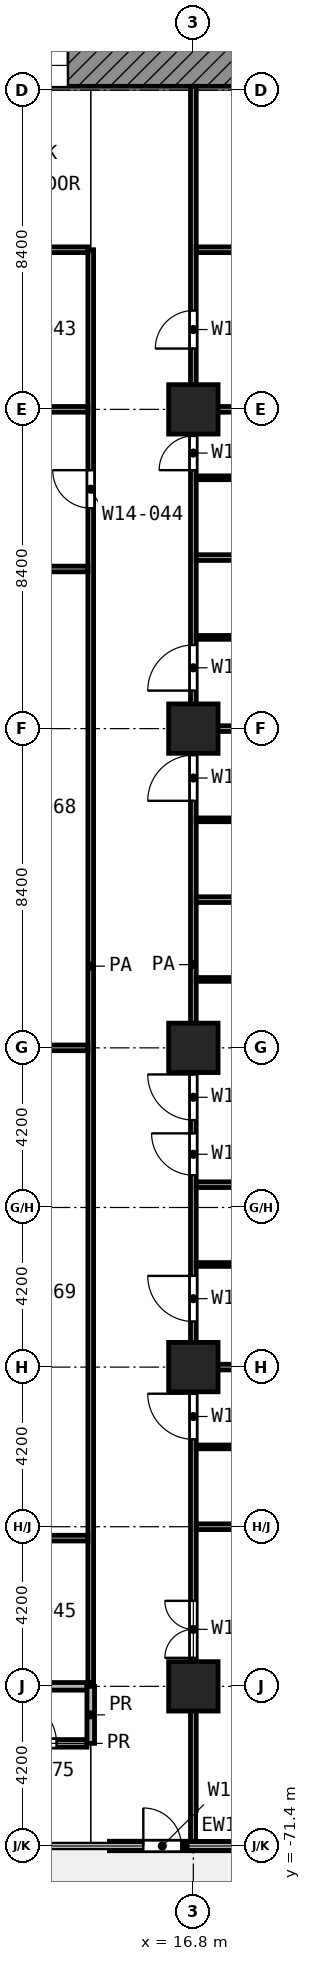
"""IFC4 building model, lengths in metres.
Left out: names, types, materials, properties, quantities, classifications, styles, units other than length and angle.
Written with IfcOpenShell. Run it as: python <this file> out.ifc"""

import sys

from ifc_helpers import new_model, si_unit, direction, frame, frame_2d, origin, origin_2d, place, context, subcontext, project, spatial, rectangle, extrude, element, fill, save


model = new_model("IFC4")
c1 = context("Model", 3, precision=1e-05, world=origin(), true_north=direction((0.0, 1.0)))
c2 = subcontext(c1, "Body", "Model", "MODEL_VIEW")
j1 = project(units=[si_unit("LENGTHUNIT", "METRE"), si_unit("PLANEANGLEUNIT", "RADIAN")], contexts=[c1])
p1 = place(None, origin())
s1 = spatial("IfcSite", under=j1, at=p1, CompositionType="ELEMENT")
p2 = place(p1, origin())
s2 = spatial("IfcBuilding", under=s1, at=p2, CompositionType="ELEMENT")
p3 = place(p2, frame((0.0, 0.0, 64.4)))
s3 = spatial("IfcBuildingStorey", under=s2, at=p3, CompositionType="ELEMENT", Elevation=64.4)
for number, where, z_axis, x_axis in (
    (1, (16.8, -33.6, 0.0), (0.0, 0.0, 1.0), (1.0, 0.0, 0.0)),
    (2, (16.8, -42.0, 0.0), (0.0, 0.0, 1.0), (1.0, 0.0, 0.0)),
    (3, (16.8, -50.4, 0.0), (0.0, 0.0, 1.0), (1.0, 0.0, 0.0)),
    (4, (16.8, -58.8, 0.0), (0.0, 0.0, 1.0), (1.0, 0.0, 0.0)),
    (5, (16.8, -67.2, 0.0), (0.0, 0.0, 1.0), (1.0, 0.0, 0.0)),
):
    element("IfcColumn", number, at=place(p3, frame(where, z_axis=z_axis, x_axis=x_axis)), inside=s3, PredefinedType="COLUMN", context=c2, shape_type="SweptSolid", body=[
        extrude(rectangle(XDim=1.3, YDim=1.3, at=origin_2d()), origin(), (0.0, 0.0, 1.0), 4.2),
    ])
p4 = place(p3, frame((14.592, -71.4, 0.0), z_axis=(0.0, 0.0, 1.0), x_axis=(1.0, 0.0, 0.0)))
e6 = element("IfcWall", 6, at=p4, inside=s3, PredefinedType="SOLIDWALL", context=c2, shape_type="SweptSolid", body=[
    extrude(rectangle(XDim=3.983, YDim=0.25, at=frame_2d((1.992, 0.0))), origin(), (0.0, 0.0, 1.0), 3.78),
])
p5 = place(p4, frame((0.892, 0.0, 0.0)))
e7 = element("IfcOpeningElement", 7, at=p5, cuts=e6, PredefinedType="OPENING", context=c2, shape_type="SweptSolid", body=[
    extrude(rectangle(XDim=1.0, YDim=2.1, at=frame_2d((0.5, 1.05))), frame((0.0, 0.135, 0.0), z_axis=(0.0, -1.0, 0.0), x_axis=(1.0, 0.0, 0.0)), (0.0, 0.0, 1.0), 0.27),
])
p6 = place(p3, frame((5.4, -24.55, 0.0), z_axis=(0.0, 0.0, 1.0), x_axis=(1.0, 0.0, 0.0)))
e8 = element("IfcWall", 8, at=p6, inside=s3, PredefinedType="SHEAR", context=c2, shape_type="SweptSolid", body=[
    extrude(rectangle(XDim=18.6, YDim=1.1, at=frame_2d((9.3, 0.0))), origin(), (0.0, 0.0, 1.0), 3.9),
])
p7 = place(p6, frame((6.3, 0.0, 0.0)))
e9 = element("IfcOpeningElement", 9, at=p7, cuts=e8, PredefinedType="OPENING", context=c2, shape_type="SweptSolid", body=[
    extrude(rectangle(XDim=1.8, YDim=2.1, at=frame_2d((0.9, 1.05))), frame((0.0, 0.56, 0.0), z_axis=(0.0, -1.0, 0.0), x_axis=(1.0, 0.0, 0.0)), (0.0, 0.0, 1.0), 1.12),
])
p8 = place(p3, frame((16.875, -60.9, 0.0), z_axis=(0.0, 0.0, 1.0), x_axis=(1.0, 0.0, 0.0)))
e10 = element("IfcWall", 10, at=p8, inside=s3, PredefinedType="PARTITIONING", context=c2, shape_type="SweptSolid", body=[
    extrude(rectangle(XDim=3.175, YDim=0.1, at=frame_2d((1.587, 0.0))), origin(), (0.0, 0.0, 1.0), 3.9),
])
p9 = place(p3, frame((16.875, -56.1, 0.0), z_axis=(0.0, 0.0, 1.0), x_axis=(1.0, 0.0, 0.0)))
e11 = element("IfcWall", 11, at=p9, inside=s3, PredefinedType="PARTITIONING", context=c2, shape_type="SweptSolid", body=[
    extrude(rectangle(XDim=2.575, YDim=0.1, at=frame_2d((1.288, 0.0))), origin(), (0.0, 0.0, 1.0), 3.9),
])
p10 = place(p3, frame((16.875, -48.6, 0.0), z_axis=(0.0, 0.0, 1.0), x_axis=(1.0, 0.0, 0.0)))
e12 = element("IfcWall", 12, at=p10, inside=s3, PredefinedType="PARTITIONING", context=c2, shape_type="SweptSolid", body=[
    extrude(rectangle(XDim=2.574, YDim=0.1, at=frame_2d((1.287, 0.0))), origin(), (0.0, 0.0, 1.0), 3.9),
])
p11 = place(p3, frame((16.875, -44.4, 0.0), z_axis=(0.0, 0.0, 1.0), x_axis=(1.0, 0.0, 0.0)))
e13 = element("IfcWall", 13, at=p11, inside=s3, PredefinedType="PARTITIONING", context=c2, shape_type="SweptSolid", body=[
    extrude(rectangle(XDim=3.175, YDim=0.1, at=frame_2d((1.587, 0.0))), origin(), (0.0, 0.0, 1.0), 3.9),
])
for number, where, z_axis, x_axis in (
    (14, (16.875, -39.6, 0.0), (0.0, 0.0, 1.0), (1.0, 0.0, 0.0)),
    (15, (16.875, -35.4, 0.0), (0.0, 0.0, 1.0), (1.0, 0.0, 0.0)),
):
    element("IfcWall", number, at=place(p3, frame(where, z_axis=z_axis, x_axis=x_axis)), inside=s3, PredefinedType="PARTITIONING", context=c2, shape_type="SweptSolid", body=[
        extrude(rectangle(XDim=2.575, YDim=0.1, at=frame_2d((1.288, 0.0))), origin(), (0.0, 0.0, 1.0), 3.9),
    ])
p12 = place(p3, frame((11.175, -63.3, 0.0), z_axis=(0.0, 0.0, 1.0), x_axis=(1.0, 0.0, 0.0)))
e16 = element("IfcWall", 16, at=p12, inside=s3, PredefinedType="PARTITIONING", context=c2, shape_type="SweptSolid", body=[
    extrude(rectangle(XDim=2.85, YDim=0.15, at=frame_2d((1.425, 0.0))), origin(), (0.0, 0.0, 1.0), 3.9),
])
for number, where, z_axis, x_axis in (
    (17, (16.875, -63.0, 0.0), (0.0, 0.0, 1.0), (1.0, 0.0, 0.0)),
    (18, (16.875, -58.8, 0.0), (0.0, 0.0, 1.0), (1.0, 0.0, 0.0)),
    (19, (16.875, -54.0, 0.0), (0.0, 0.0, 1.0), (1.0, 0.0, 0.0)),
):
    element("IfcWall", number, at=place(p3, frame(where, z_axis=z_axis, x_axis=x_axis)), inside=s3, PredefinedType="PARTITIONING", context=c2, shape_type="SweptSolid", body=[
        extrude(rectangle(XDim=8.245, YDim=0.15, at=frame_2d((4.123, 0.0))), origin(), (0.0, 0.0, 1.0), 3.9),
    ])
p13 = place(p3, frame((11.175, -50.4, 0.0), z_axis=(0.0, 0.0, 1.0), x_axis=(1.0, 0.0, 0.0)))
e20 = element("IfcWall", 20, at=p13, inside=s3, PredefinedType="PARTITIONING", context=c2, shape_type="SweptSolid", body=[
    extrude(rectangle(XDim=2.85, YDim=0.15, at=frame_2d((1.425, 0.0))), origin(), (0.0, 0.0, 1.0), 3.9),
])
for number, where, z_axis, x_axis in (
    (21, (16.875, -46.5, 0.0), (0.0, 0.0, 1.0), (1.0, 0.0, 0.0)),
    (22, (16.875, -42.0, 0.0), (0.0, 0.0, 1.0), (1.0, 0.0, 0.0)),
):
    element("IfcWall", number, at=place(p3, frame(where, z_axis=z_axis, x_axis=x_axis)), inside=s3, PredefinedType="PARTITIONING", context=c2, shape_type="SweptSolid", body=[
        extrude(rectangle(XDim=8.245, YDim=0.15, at=frame_2d((4.123, 0.0))), origin(), (0.0, 0.0, 1.0), 3.9),
    ])
p14 = place(p3, frame((11.175, -37.8, 0.0), z_axis=(0.0, 0.0, 1.0), x_axis=(1.0, 0.0, 0.0)))
e23 = element("IfcWall", 23, at=p14, inside=s3, PredefinedType="PARTITIONING", context=c2, shape_type="SweptSolid", body=[
    extrude(rectangle(XDim=2.85, YDim=0.15, at=frame_2d((1.425, 0.0))), origin(), (0.0, 0.0, 1.0), 3.9),
])
p15 = place(p3, frame((16.875, -37.5, 0.0), z_axis=(0.0, 0.0, 1.0), x_axis=(1.0, 0.0, 0.0)))
e24 = element("IfcWall", 24, at=p15, inside=s3, PredefinedType="PARTITIONING", context=c2, shape_type="SweptSolid", body=[
    extrude(rectangle(XDim=8.245, YDim=0.15, at=frame_2d((4.123, 0.0))), origin(), (0.0, 0.0, 1.0), 3.9),
])
p16 = place(p3, frame((11.175, -33.6, 0.0), z_axis=(0.0, 0.0, 1.0), x_axis=(1.0, 0.0, 0.0)))
e25 = element("IfcWall", 25, at=p16, inside=s3, PredefinedType="PARTITIONING", context=c2, shape_type="SweptSolid", body=[
    extrude(rectangle(XDim=2.85, YDim=0.15, at=frame_2d((1.425, 0.0))), origin(), (0.0, 0.0, 1.0), 3.9),
])
p17 = place(p3, frame((16.875, -33.6, 0.0), z_axis=(0.0, 0.0, 1.0), x_axis=(1.0, 0.0, 0.0)))
e26 = element("IfcWall", 26, at=p17, inside=s3, PredefinedType="PARTITIONING", context=c2, shape_type="SweptSolid", body=[
    extrude(rectangle(XDim=8.245, YDim=0.15, at=frame_2d((4.123, 0.0))), origin(), (0.0, 0.0, 1.0), 3.9),
])
p18 = place(p3, frame((11.175, -29.4, 0.0), z_axis=(0.0, 0.0, 1.0), x_axis=(1.0, 0.0, 0.0)))
e27 = element("IfcWall", 27, at=p18, inside=s3, PredefinedType="PARTITIONING", context=c2, shape_type="SweptSolid", body=[
    extrude(rectangle(XDim=2.85, YDim=0.15, at=frame_2d((1.425, 0.0))), origin(), (0.0, 0.0, 1.0), 3.9),
])
p19 = place(p3, frame((16.875, -29.4, 0.0), z_axis=(0.0, 0.0, 1.0), x_axis=(1.0, 0.0, 0.0)))
e28 = element("IfcWall", 28, at=p19, inside=s3, PredefinedType="PARTITIONING", context=c2, shape_type="SweptSolid", body=[
    extrude(rectangle(XDim=8.25, YDim=0.15, at=frame_2d((4.125, 0.0))), origin(), (0.0, 0.0, 1.0), 3.9),
])
p20 = place(p3, frame((14.1, -67.1, 0.0), z_axis=(0.0, 0.0, 1.0), x_axis=(0.0, 1.0, 0.0)))
e29 = element("IfcWall", 29, at=p20, inside=s3, PredefinedType="PARTITIONING", context=c2, shape_type="SweptSolid", body=[
    extrude(rectangle(XDim=37.7, YDim=0.15, at=frame_2d((18.85, 0.0))), origin(), (0.0, 0.0, 1.0), 3.9),
])
p21 = place(p20, frame((30.9, 0.0, 0.0)))
e30 = element("IfcOpeningElement", 30, at=p21, cuts=e29, PredefinedType="OPENING", context=c2, shape_type="SweptSolid", body=[
    extrude(rectangle(XDim=1.0, YDim=2.1, at=frame_2d((0.5, 1.05))), frame((0.0, 0.085, 0.0), z_axis=(0.0, -1.0, 0.0), x_axis=(1.0, 0.0, 0.0)), (0.0, 0.0, 1.0), 0.17),
])
p22 = place(p3, frame((16.8, -71.32, 0.0), z_axis=(0.0, 0.0, 1.0), x_axis=(0.0, 1.0, 0.0)))
e31 = element("IfcWall", 31, at=p22, inside=s3, PredefinedType="PARTITIONING", context=c2, shape_type="SweptSolid", body=[
    extrude(rectangle(XDim=46.22, YDim=0.15, at=frame_2d((23.11, 0.0))), origin(), (0.0, 0.0, 1.0), 3.9),
])
p23 = place(p22, frame((39.32, 0.0, 0.0)))
e32 = element("IfcOpeningElement", 32, at=p23, cuts=e31, PredefinedType="OPENING", context=c2, shape_type="SweptSolid", body=[
    extrude(rectangle(XDim=1.0, YDim=2.1, at=frame_2d((0.5, 1.05))), frame((0.0, 0.085, 0.0), z_axis=(0.0, -1.0, 0.0), x_axis=(1.0, 0.0, 0.0)), (0.0, 0.0, 1.0), 0.17),
])
p24 = place(p22, frame((36.12, 0.0, 0.0)))
e33 = element("IfcOpeningElement", 33, at=p24, cuts=e31, PredefinedType="OPENING", context=c2, shape_type="SweptSolid", body=[
    extrude(rectangle(XDim=0.9, YDim=2.1, at=frame_2d((0.45, 1.05))), frame((0.0, 0.085, 0.0), z_axis=(0.0, -1.0, 0.0), x_axis=(1.0, 0.0, 0.0)), (0.0, 0.0, 1.0), 0.17),
])
p25 = place(p22, frame((30.32, 0.0, 0.0)))
e34 = element("IfcOpeningElement", 34, at=p25, cuts=e31, PredefinedType="OPENING", context=c2, shape_type="SweptSolid", body=[
    extrude(rectangle(XDim=1.2, YDim=2.1, at=frame_2d((0.6, 1.05))), frame((0.0, 0.085, 0.0), z_axis=(0.0, -1.0, 0.0), x_axis=(1.0, 0.0, 0.0)), (0.0, 0.0, 1.0), 0.17),
])
p26 = place(p22, frame((27.42, 0.0, 0.0)))
e35 = element("IfcOpeningElement", 35, at=p26, cuts=e31, PredefinedType="OPENING", context=c2, shape_type="SweptSolid", body=[
    extrude(rectangle(XDim=1.2, YDim=2.1, at=frame_2d((0.6, 1.05))), frame((0.0, 0.085, 0.0), z_axis=(0.0, -1.0, 0.0), x_axis=(1.0, 0.0, 0.0)), (0.0, 0.0, 1.0), 0.17),
])
p27 = place(p22, frame((19.02, 0.0, 0.0)))
e36 = element("IfcOpeningElement", 36, at=p27, cuts=e31, PredefinedType="OPENING", context=c2, shape_type="SweptSolid", body=[
    extrude(rectangle(XDim=1.2, YDim=2.1, at=frame_2d((0.6, 1.05))), frame((0.0, 0.085, 0.0), z_axis=(0.0, -1.0, 0.0), x_axis=(1.0, 0.0, 0.0)), (0.0, 0.0, 1.0), 0.17),
])
p28 = place(p22, frame((17.57, 0.0, 0.0)))
e37 = element("IfcOpeningElement", 37, at=p28, cuts=e31, PredefinedType="OPENING", context=c2, shape_type="SweptSolid", body=[
    extrude(rectangle(XDim=1.1, YDim=2.1, at=frame_2d((0.55, 1.05))), frame((0.0, 0.085, 0.0), z_axis=(0.0, -1.0, 0.0), x_axis=(1.0, 0.0, 0.0)), (0.0, 0.0, 1.0), 0.17),
])
p29 = place(p22, frame((13.72, 0.0, 0.0)))
e38 = element("IfcOpeningElement", 38, at=p29, cuts=e31, PredefinedType="OPENING", context=c2, shape_type="SweptSolid", body=[
    extrude(rectangle(XDim=1.2, YDim=2.1, at=frame_2d((0.6, 1.05))), frame((0.0, 0.085, 0.0), z_axis=(0.0, -1.0, 0.0), x_axis=(1.0, 0.0, 0.0)), (0.0, 0.0, 1.0), 0.17),
])
p30 = place(p22, frame((10.62, 0.0, 0.0)))
e39 = element("IfcOpeningElement", 39, at=p30, cuts=e31, PredefinedType="OPENING", context=c2, shape_type="SweptSolid", body=[
    extrude(rectangle(XDim=1.2, YDim=2.1, at=frame_2d((0.6, 1.05))), frame((0.0, 0.085, 0.0), z_axis=(0.0, -1.0, 0.0), x_axis=(1.0, 0.0, 0.0)), (0.0, 0.0, 1.0), 0.17),
])
p31 = place(p22, frame((4.87, 0.0, 0.0)))
e40 = element("IfcOpeningElement", 40, at=p31, cuts=e31, PredefinedType="OPENING", context=c2, shape_type="SweptSolid", body=[
    extrude(rectangle(XDim=1.5, YDim=2.1, at=frame_2d((0.75, 1.05))), frame((0.0, 0.085, 0.0), z_axis=(0.0, -1.0, 0.0), x_axis=(1.0, 0.0, 0.0)), (0.0, 0.0, 1.0), 0.17),
])
p32 = place(p3, frame((11.2, -68.7, 0.0), z_axis=(0.0, 0.0, 1.0), x_axis=(1.0, 0.0, 0.0)))
e41 = element("IfcWall", 41, at=p32, inside=s3, PredefinedType="PARTITIONING", context=c2, shape_type="SweptSolid", body=[
    extrude(rectangle(XDim=2.8, YDim=0.2, at=frame_2d((1.4, 0.0))), origin(), (0.0, 0.0, 1.0), 3.9),
])
p33 = place(p32, frame((0.8, 0.0, 0.0)))
e42 = element("IfcOpeningElement", 42, at=p33, cuts=e41, PredefinedType="OPENING", context=c2, shape_type="SweptSolid", body=[
    extrude(rectangle(XDim=1.2, YDim=2.1, at=frame_2d((0.6, 1.05))), frame((0.0, 0.11, 0.0), z_axis=(0.0, -1.0, 0.0), x_axis=(1.0, 0.0, 0.0)), (0.0, 0.0, 1.0), 0.22),
])
p34 = place(p3, frame((11.2, -67.2, 0.0), z_axis=(0.0, 0.0, 1.0), x_axis=(1.0, 0.0, 0.0)))
e43 = element("IfcWall", 43, at=p34, inside=s3, PredefinedType="PARTITIONING", context=c2, shape_type="SweptSolid", body=[
    extrude(rectangle(XDim=2.8, YDim=0.2, at=frame_2d((1.4, 0.0))), origin(), (0.0, 0.0, 1.0), 3.9),
])
p35 = place(p3, frame((14.1, -68.7, 0.0), z_axis=(0.0, 0.0, 1.0), x_axis=(0.0, 1.0, 0.0)))
e44 = element("IfcWall", 44, at=p35, inside=s3, PredefinedType="PARTITIONING", context=c2, shape_type="SweptSolid", body=[
    extrude(rectangle(XDim=1.5, YDim=0.2, at=frame_2d((0.75, 0.0))), origin(), (0.0, 0.0, 1.0), 3.9),
])
p36 = place(p5, origin())
e45 = element("IfcDoor", 45, at=p36, inside=s3, OperationType="SINGLE_SWING_LEFT", PredefinedType="DOOR", context=c2, shape_type="SweptSolid", body=[
    extrude(rectangle(XDim=1.0, YDim=2.1, at=frame_2d((0.5, 1.05))), frame((0.0, 0.025, 0.0), z_axis=(0.0, -1.0, 0.0), x_axis=(1.0, 0.0, 0.0)), (0.0, 0.0, 1.0), 0.05),
])
fill(e7, e45)
p37 = place(p7, origin())
e46 = element("IfcDoor", 46, at=p37, inside=s3, OperationType="DOUBLE_DOOR_SINGLE_SWING", PredefinedType="DOOR", context=c2, shape_type="SweptSolid", body=[
    extrude(rectangle(XDim=1.8, YDim=2.1, at=frame_2d((0.9, 1.05))), frame((0.0, 0.025, 0.0), z_axis=(0.0, -1.0, 0.0), x_axis=(1.0, 0.0, 0.0)), (0.0, 0.0, 1.0), 0.05),
])
fill(e9, e46)
p38 = place(p21, origin())
e47 = element("IfcDoor", 47, at=p38, inside=s3, OperationType="SINGLE_SWING_RIGHT", PredefinedType="DOOR", context=c2, shape_type="SweptSolid", body=[
    extrude(rectangle(XDim=1.0, YDim=2.1, at=frame_2d((0.5, 1.05))), frame((0.0, 0.025, 0.0), z_axis=(0.0, -1.0, 0.0), x_axis=(1.0, 0.0, 0.0)), (0.0, 0.0, 1.0), 0.05),
])
fill(e30, e47)
p39 = place(p33, origin())
e48 = element("IfcDoor", 48, at=p39, inside=s3, OperationType="SINGLE_SWING_LEFT", PredefinedType="DOOR", context=c2, shape_type="SweptSolid", body=[
    extrude(rectangle(XDim=1.2, YDim=2.1, at=frame_2d((0.6, 1.05))), frame((0.0, 0.025, 0.0), z_axis=(0.0, -1.0, 0.0), x_axis=(1.0, 0.0, 0.0)), (0.0, 0.0, 1.0), 0.05),
])
fill(e42, e48)
p40 = place(p23, origin())
e49 = element("IfcDoor", 49, at=p40, inside=s3, OperationType="SINGLE_SWING_LEFT", PredefinedType="DOOR", context=c2, shape_type="SweptSolid", body=[
    extrude(rectangle(XDim=1.0, YDim=2.1, at=frame_2d((0.5, 1.05))), frame((0.0, 0.025, 0.0), z_axis=(0.0, -1.0, 0.0), x_axis=(1.0, 0.0, 0.0)), (0.0, 0.0, 1.0), 0.05),
])
fill(e32, e49)
p41 = place(p24, origin())
e50 = element("IfcDoor", 50, at=p41, inside=s3, OperationType="SINGLE_SWING_LEFT", PredefinedType="DOOR", context=c2, shape_type="SweptSolid", body=[
    extrude(rectangle(XDim=0.9, YDim=2.1, at=frame_2d((0.45, 1.05))), frame((0.0, 0.025, 0.0), z_axis=(0.0, -1.0, 0.0), x_axis=(1.0, 0.0, 0.0)), (0.0, 0.0, 1.0), 0.05),
])
fill(e33, e50)
p42 = place(p25, origin())
e51 = element("IfcDoor", 51, at=p42, inside=s3, OperationType="SINGLE_SWING_LEFT", PredefinedType="DOOR", context=c2, shape_type="SweptSolid", body=[
    extrude(rectangle(XDim=1.2, YDim=2.1, at=frame_2d((0.6, 1.05))), frame((0.0, 0.025, 0.0), z_axis=(0.0, -1.0, 0.0), x_axis=(1.0, 0.0, 0.0)), (0.0, 0.0, 1.0), 0.05),
])
fill(e34, e51)
p43 = place(p26, origin())
e52 = element("IfcDoor", 52, at=p43, inside=s3, OperationType="SINGLE_SWING_LEFT", PredefinedType="DOOR", context=c2, shape_type="SweptSolid", body=[
    extrude(rectangle(XDim=1.2, YDim=2.1, at=frame_2d((0.6, 1.05))), frame((0.0, 0.025, 0.0), z_axis=(0.0, -1.0, 0.0), x_axis=(1.0, 0.0, 0.0)), (0.0, 0.0, 1.0), 0.05),
])
fill(e35, e52)
p44 = place(p27, origin())
e53 = element("IfcDoor", 53, at=p44, inside=s3, OperationType="SINGLE_SWING_RIGHT", PredefinedType="DOOR", context=c2, shape_type="SweptSolid", body=[
    extrude(rectangle(XDim=1.2, YDim=2.1, at=frame_2d((0.6, 1.05))), frame((0.0, 0.025, 0.0), z_axis=(0.0, -1.0, 0.0), x_axis=(1.0, 0.0, 0.0)), (0.0, 0.0, 1.0), 0.05),
])
fill(e36, e53)
p45 = place(p28, origin())
e54 = element("IfcDoor", 54, at=p45, inside=s3, OperationType="SINGLE_SWING_RIGHT", PredefinedType="DOOR", context=c2, shape_type="SweptSolid", body=[
    extrude(rectangle(XDim=1.1, YDim=2.1, at=frame_2d((0.55, 1.05))), frame((0.0, 0.025, 0.0), z_axis=(0.0, -1.0, 0.0), x_axis=(1.0, 0.0, 0.0)), (0.0, 0.0, 1.0), 0.05),
])
fill(e37, e54)
p46 = place(p29, origin())
e55 = element("IfcDoor", 55, at=p46, inside=s3, OperationType="SINGLE_SWING_RIGHT", PredefinedType="DOOR", context=c2, shape_type="SweptSolid", body=[
    extrude(rectangle(XDim=1.2, YDim=2.1, at=frame_2d((0.6, 1.05))), frame((0.0, 0.025, 0.0), z_axis=(0.0, -1.0, 0.0), x_axis=(1.0, 0.0, 0.0)), (0.0, 0.0, 1.0), 0.05),
])
fill(e38, e55)
p47 = place(p30, origin())
e56 = element("IfcDoor", 56, at=p47, inside=s3, OperationType="SINGLE_SWING_RIGHT", PredefinedType="DOOR", context=c2, shape_type="SweptSolid", body=[
    extrude(rectangle(XDim=1.2, YDim=2.1, at=frame_2d((0.6, 1.05))), frame((0.0, 0.025, 0.0), z_axis=(0.0, -1.0, 0.0), x_axis=(1.0, 0.0, 0.0)), (0.0, 0.0, 1.0), 0.05),
])
fill(e39, e56)
p48 = place(p31, origin())
e57 = element("IfcDoor", 57, at=p48, inside=s3, OperationType="DOUBLE_DOOR_SINGLE_SWING", PredefinedType="DOOR", context=c2, shape_type="SweptSolid", body=[
    extrude(rectangle(XDim=1.5, YDim=2.1, at=frame_2d((0.75, 1.05))), frame((0.0, 0.025, 0.0), z_axis=(0.0, -1.0, 0.0), x_axis=(1.0, 0.0, 0.0)), (0.0, 0.0, 1.0), 0.05),
])
fill(e40, e57)
save(model, sys.argv[1])
